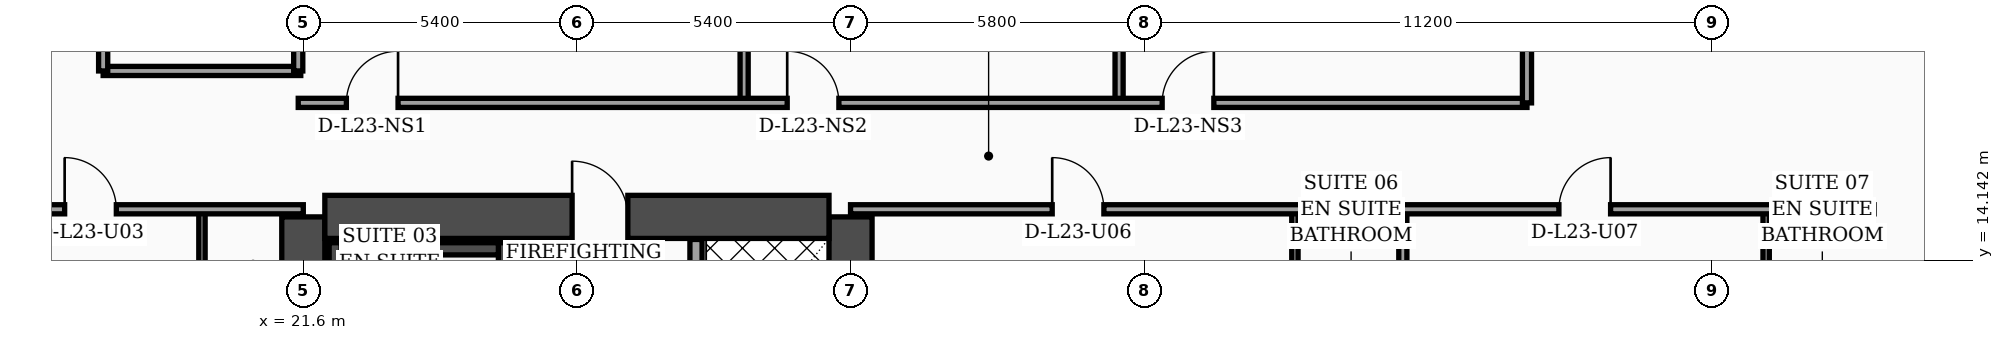
"""IFC4 building model, lengths in metres.
Left out: names, types, materials, properties, quantities, classifications, styles, units other than length and angle.
Written with IfcOpenShell. Run it as: python <this file> out.ifc"""

import sys

from ifc_helpers import new_model, si_unit, direction, frame, frame_2d, origin, place, context, subcontext, project, spatial, rectangle, extrude, element, fill, save


model = new_model("IFC4")
c1 = context("Model", 3, precision=1e-05, world=origin(), true_north=direction((0.0, 1.0)))
c2 = subcontext(c1, "Body", "Model", "MODEL_VIEW")
j1 = project(units=[si_unit("LENGTHUNIT", "METRE"), si_unit("PLANEANGLEUNIT", "RADIAN")], contexts=[c1])
p1 = place(None, origin())
s1 = spatial("IfcSite", under=j1, at=p1, CompositionType="ELEMENT")
p2 = place(p1, origin())
s2 = spatial("IfcBuilding", under=s1, at=p2, CompositionType="ELEMENT")
p3 = place(p2, frame((0.0, 0.0, 97.4)))
s3 = spatial("IfcBuildingStorey", under=s2, at=p3, CompositionType="ELEMENT", Elevation=97.4)
for number, where, z_axis, x_axis in (
    (1, (21.6, 4.6, 0.0), (0.0, 0.0, 1.0), (0.0, 1.0, 0.0)),
    (2, (32.4, 4.6, 0.0), (0.0, 0.0, 1.0), (0.0, 1.0, 0.0)),
):
    element("IfcWall", number, at=place(p3, frame(where, z_axis=z_axis, x_axis=x_axis)), inside=s3, PredefinedType="SHEAR", context=c2, shape_type="SweptSolid", body=[
        extrude(rectangle(XDim=10.4, YDim=0.85, at=frame_2d((5.2, 0.0))), origin(), (0.0, 0.0, 1.0), 3.56),
    ])
p4 = place(p3, frame((22.025, 15.0, 0.0), z_axis=(0.0, 0.0, 1.0), x_axis=(1.0, 0.0, 0.0)))
e3 = element("IfcWall", 3, at=p4, inside=s3, PredefinedType="SHEAR", context=c2, shape_type="SweptSolid", body=[
    extrude(rectangle(XDim=9.95, YDim=0.85, at=frame_2d((4.975, 0.0))), origin(), (0.0, 0.0, 1.0), 3.56),
])
p5 = place(p4, frame((4.88, 0.0, 0.0)))
e4 = element("IfcOpeningElement", 4, at=p5, cuts=e3, PredefinedType="OPENING", context=c2, shape_type="SweptSolid", body=[
    extrude(rectangle(XDim=1.1, YDim=2.2, at=frame_2d((0.55, 1.1))), frame((0.0, 0.435, 0.0), z_axis=(0.0, -1.0, 0.0), x_axis=(1.0, 0.0, 0.0)), (0.0, 0.0, 1.0), 0.87),
])
p6 = place(p3, frame((22.23, 5.025, 0.0), z_axis=(0.0, 0.0, 1.0), x_axis=(0.0, 1.0, 0.0)))
e5 = element("IfcWall", 5, at=p6, inside=s3, PredefinedType="SOLIDWALL", context=c2, shape_type="SweptSolid", body=[
    extrude(rectangle(XDim=9.465, YDim=0.24, at=frame_2d((4.732, 0.0))), origin(), (0.0, 0.0, 1.0), 3.56),
])
p7 = place(p3, frame((25.57, 5.025, 0.0), z_axis=(0.0, 0.0, 1.0), x_axis=(0.0, 1.0, 0.0)))
e6 = element("IfcWall", 6, at=p7, inside=s3, PredefinedType="SOLIDWALL", context=c2, shape_type="SweptSolid", body=[
    extrude(rectangle(XDim=9.465, YDim=0.24, at=frame_2d((4.732, 0.0))), origin(), (0.0, 0.0, 1.0), 3.56),
])
p8 = place(p7, frame((0.35, 0.0, 0.0)))
e7 = element("IfcOpeningElement", 7, at=p8, cuts=e6, PredefinedType="OPENING", context=c2, shape_type="SweptSolid", body=[
    extrude(rectangle(XDim=1.15, YDim=2.2, at=frame_2d((0.575, 1.1))), frame((0.0, 0.13, 0.0), z_axis=(0.0, -1.0, 0.0), x_axis=(1.0, 0.0, 0.0)), (0.0, 0.0, 1.0), 0.26),
])
p9 = place(p3, frame((22.35, 14.37, 0.0), z_axis=(0.0, 0.0, 1.0), x_axis=(1.0, 0.0, 0.0)))
e8 = element("IfcWall", 8, at=p9, inside=s3, PredefinedType="SOLIDWALL", context=c2, shape_type="SweptSolid", body=[
    extrude(rectangle(XDim=3.1, YDim=0.24, at=frame_2d((1.55, 0.0))), origin(), (0.0, 0.0, 1.0), 3.56),
])
p10 = place(p3, frame((59.23, 5.505, 0.0), z_axis=(0.0, 0.0, 1.0), x_axis=(-0.300509063924, 0.953778958931, 0.0)))
e9 = element("IfcWall", 9, at=p10, inside=s3, PredefinedType="SOLIDWALL", context=c2, shape_type="SweptSolid", body=[
    extrude(rectangle(XDim=30.814, YDim=0.32, at=frame_2d((15.407, 0.0))), origin(), (0.0, 0.0, 1.0), 3.56),
])
p11 = place(p10, frame((8.9, 0.0, 0.0)))
e10 = element("IfcOpeningElement", 10, at=p11, cuts=e9, PredefinedType="OPENING", context=c2, shape_type="SweptSolid", body=[
    extrude(rectangle(XDim=1.4, YDim=2.25, at=frame_2d((0.7, 1.125))), frame((0.0, 0.17, 0.0), z_axis=(0.0, -1.0, 0.0), x_axis=(1.0, 0.0, 0.0)), (0.0, 0.0, 1.0), 0.34),
])
p12 = place(p10, frame((1.6, 0.0, 0.75)))
e11 = element("IfcOpeningElement", 11, at=p12, cuts=e9, PredefinedType="OPENING", context=c2, shape_type="SweptSolid", body=[
    extrude(rectangle(XDim=1.5, YDim=1.6, at=frame_2d((0.75, 0.8))), frame((0.0, 0.17, 0.0), z_axis=(0.0, -1.0, 0.0), x_axis=(1.0, 0.0, 0.0)), (0.0, 0.0, 1.0), 0.34),
])
p13 = place(p10, frame((4.7, 0.0, 0.75)))
e12 = element("IfcOpeningElement", 12, at=p13, cuts=e9, PredefinedType="OPENING", context=c2, shape_type="SweptSolid", body=[
    extrude(rectangle(XDim=1.5, YDim=1.6, at=frame_2d((0.75, 0.8))), frame((0.0, 0.17, 0.0), z_axis=(0.0, -1.0, 0.0), x_axis=(1.0, 0.0, 0.0)), (0.0, 0.0, 1.0), 0.34),
])
p14 = place(p10, frame((6.75, 0.0, 0.75)))
e13 = element("IfcOpeningElement", 13, at=p14, cuts=e9, PredefinedType="OPENING", context=c2, shape_type="SweptSolid", body=[
    extrude(rectangle(XDim=1.5, YDim=1.6, at=frame_2d((0.75, 0.8))), frame((0.0, 0.17, 0.0), z_axis=(0.0, -1.0, 0.0), x_axis=(1.0, 0.0, 0.0)), (0.0, 0.0, 1.0), 0.34),
])
p15 = place(p10, frame((10.9, 0.0, 0.75)))
e14 = element("IfcOpeningElement", 14, at=p15, cuts=e9, PredefinedType="OPENING", context=c2, shape_type="SweptSolid", body=[
    extrude(rectangle(XDim=1.5, YDim=1.6, at=frame_2d((0.75, 0.8))), frame((0.0, 0.17, 0.0), z_axis=(0.0, -1.0, 0.0), x_axis=(1.0, 0.0, 0.0)), (0.0, 0.0, 1.0), 0.34),
])
p16 = place(p10, frame((14.0, 0.0, 0.75)))
e15 = element("IfcOpeningElement", 15, at=p16, cuts=e9, PredefinedType="OPENING", context=c2, shape_type="SweptSolid", body=[
    extrude(rectangle(XDim=1.5, YDim=1.6, at=frame_2d((0.75, 0.8))), frame((0.0, 0.17, 0.0), z_axis=(0.0, -1.0, 0.0), x_axis=(1.0, 0.0, 0.0)), (0.0, 0.0, 1.0), 0.34),
])
p17 = place(p10, frame((17.1, 0.0, 0.75)))
e16 = element("IfcOpeningElement", 16, at=p17, cuts=e9, PredefinedType="OPENING", context=c2, shape_type="SweptSolid", body=[
    extrude(rectangle(XDim=1.5, YDim=1.6, at=frame_2d((0.75, 0.8))), frame((0.0, 0.17, 0.0), z_axis=(0.0, -1.0, 0.0), x_axis=(1.0, 0.0, 0.0)), (0.0, 0.0, 1.0), 0.34),
])
p18 = place(p10, frame((20.2, 0.0, 0.75)))
e17 = element("IfcOpeningElement", 17, at=p18, cuts=e9, PredefinedType="OPENING", context=c2, shape_type="SweptSolid", body=[
    extrude(rectangle(XDim=1.5, YDim=1.6, at=frame_2d((0.75, 0.8))), frame((0.0, 0.17, 0.0), z_axis=(0.0, -1.0, 0.0), x_axis=(1.0, 0.0, 0.0)), (0.0, 0.0, 1.0), 0.34),
])
p19 = place(p10, frame((23.3, 0.0, 0.75)))
e18 = element("IfcOpeningElement", 18, at=p19, cuts=e9, PredefinedType="OPENING", context=c2, shape_type="SweptSolid", body=[
    extrude(rectangle(XDim=1.5, YDim=1.6, at=frame_2d((0.75, 0.8))), frame((0.0, 0.17, 0.0), z_axis=(0.0, -1.0, 0.0), x_axis=(1.0, 0.0, 0.0)), (0.0, 0.0, 1.0), 0.34),
])
p20 = place(p10, frame((26.4, 0.0, 0.75)))
e19 = element("IfcOpeningElement", 19, at=p20, cuts=e9, PredefinedType="OPENING", context=c2, shape_type="SweptSolid", body=[
    extrude(rectangle(XDim=1.5, YDim=1.6, at=frame_2d((0.75, 0.8))), frame((0.0, 0.17, 0.0), z_axis=(0.0, -1.0, 0.0), x_axis=(1.0, 0.0, 0.0)), (0.0, 0.0, 1.0), 0.34),
])
p21 = place(p3, frame((29.35, 5.045, 0.0), z_axis=(0.0, 0.0, 1.0), x_axis=(0.0, 1.0, 0.0)))
e20 = element("IfcWall", 20, at=p21, inside=s3, PredefinedType="SOLIDWALL", context=c2, shape_type="SweptSolid", body=[
    extrude(rectangle(XDim=9.51, YDim=0.24, at=frame_2d((4.755, 0.0))), origin(), (0.0, 0.0, 1.0), 3.56),
])
p22 = place(p21, frame((0.55, 0.0, 0.0)))
e21 = element("IfcOpeningElement", 21, at=p22, cuts=e20, PredefinedType="OPENING", context=c2, shape_type="SweptSolid", body=[
    extrude(rectangle(XDim=1.3, YDim=2.35, at=frame_2d((0.65, 1.175))), frame((0.0, 0.13, 0.0), z_axis=(0.0, -1.0, 0.0), x_axis=(1.0, 0.0, 0.0)), (0.0, 0.0, 1.0), 0.26),
])
p23 = place(p3, frame((19.6, 2.44, 0.0), z_axis=(0.0, 0.0, 1.0), x_axis=(0.0, 1.0, 0.0)))
e22 = element("IfcWall", 22, at=p23, inside=s3, PredefinedType="PARTITIONING", context=c2, shape_type="SweptSolid", body=[
    extrude(rectangle(XDim=12.71, YDim=0.125, at=frame_2d((6.355, 0.0))), origin(), (0.0, 0.0, 1.0), 2.49),
])
p24 = place(p23, frame((4.34, 0.0, 0.0)))
e23 = element("IfcOpeningElement", 23, at=p24, cuts=e22, PredefinedType="OPENING", context=c2, shape_type="SweptSolid", body=[
    extrude(rectangle(XDim=0.96, YDim=2.2, at=frame_2d((0.48, 1.1))), frame((0.0, 0.073, 0.0), z_axis=(0.0, -1.0, 0.0), x_axis=(1.0, 0.0, 0.0)), (0.0, 0.0, 1.0), 0.145),
])
p25 = place(p23, frame((10.18, 0.0, 0.0)))
e24 = element("IfcOpeningElement", 24, at=p25, cuts=e22, PredefinedType="OPENING", context=c2, shape_type="SweptSolid", body=[
    extrude(rectangle(XDim=0.9, YDim=2.15, at=frame_2d((0.45, 1.075))), frame((0.0, 0.073, 0.0), z_axis=(0.0, -1.0, 0.0), x_axis=(1.0, 0.0, 0.0)), (0.0, 0.0, 1.0), 0.145),
])
p26 = place(p3, frame((15.15, 15.15, 0.0), z_axis=(0.0, 0.0, 1.0), x_axis=(1.0, 0.0, 0.0)))
e25 = element("IfcWall", 25, at=p26, inside=s3, PredefinedType="PARTITIONING", context=c2, shape_type="SweptSolid", body=[
    extrude(rectangle(XDim=6.45, YDim=0.18, at=frame_2d((3.225, 0.0))), origin(), (0.0, 0.0, 1.0), 2.49),
])
p27 = place(p26, frame((1.74, 0.0, 0.0)))
e26 = element("IfcOpeningElement", 26, at=p27, cuts=e25, PredefinedType="OPENING", context=c2, shape_type="SweptSolid", body=[
    extrude(rectangle(XDim=1.02, YDim=2.2, at=frame_2d((0.51, 1.1))), frame((0.0, 0.1, 0.0), z_axis=(0.0, -1.0, 0.0), x_axis=(1.0, 0.0, 0.0)), (0.0, 0.0, 1.0), 0.2),
])
p28 = place(p3, frame((17.65, 17.88, 0.0), z_axis=(0.0, 0.0, 1.0), x_axis=(1.0, 0.0, 0.0)))
e27 = element("IfcWall", 27, at=p28, inside=s3, PredefinedType="PARTITIONING", context=c2, shape_type="SweptSolid", body=[
    extrude(rectangle(XDim=3.9, YDim=0.18, at=frame_2d((1.95, 0.0))), origin(), (0.0, 0.0, 1.0), 3.56),
])
p29 = place(p3, frame((21.5, 17.88, 0.0), z_axis=(0.0, 0.0, 1.0), x_axis=(0.0, 1.0, 0.0)))
e28 = element("IfcWall", 28, at=p29, inside=s3, PredefinedType="PARTITIONING", context=c2, shape_type="SweptSolid", body=[
    extrude(rectangle(XDim=6.44, YDim=0.18, at=frame_2d((3.22, 0.0))), origin(), (0.0, 0.0, 1.0), 3.56),
])
p30 = place(p3, frame((17.65, 17.88, 0.0), z_axis=(0.0, 0.0, 1.0), x_axis=(0.0, 1.0, 0.0)))
e29 = element("IfcWall", 29, at=p30, inside=s3, PredefinedType="PARTITIONING", context=c2, shape_type="SweptSolid", body=[
    extrude(rectangle(XDim=6.44, YDim=0.18, at=frame_2d((3.22, 0.0))), origin(), (0.0, 0.0, 1.0), 3.56),
])
p31 = place(p30, frame((0.65, 0.0, 0.0)))
e30 = element("IfcOpeningElement", 30, at=p31, cuts=e29, PredefinedType="OPENING", context=c2, shape_type="SweptSolid", body=[
    extrude(rectangle(XDim=0.98, YDim=2.15, at=frame_2d((0.49, 1.075))), frame((0.0, 0.1, 0.0), z_axis=(0.0, -1.0, 0.0), x_axis=(1.0, 0.0, 0.0)), (0.0, 0.0, 1.0), 0.2),
])
p32 = place(p30, frame((3.97, 0.0, 0.0)))
e31 = element("IfcOpeningElement", 31, at=p32, cuts=e29, PredefinedType="OPENING", context=c2, shape_type="SweptSolid", body=[
    extrude(rectangle(XDim=0.96, YDim=2.2, at=frame_2d((0.48, 1.1))), frame((0.0, 0.1, 0.0), z_axis=(0.0, -1.0, 0.0), x_axis=(1.0, 0.0, 0.0)), (0.0, 0.0, 1.0), 0.2),
])
p33 = place(p3, frame((41.17, 2.44, 0.0), z_axis=(0.0, 0.0, 1.0), x_axis=(0.0, 1.0, 0.0)))
e32 = element("IfcWall", 32, at=p33, inside=s3, PredefinedType="PARTITIONING", context=c2, shape_type="SweptSolid", body=[
    extrude(rectangle(XDim=12.71, YDim=0.125, at=frame_2d((6.355, 0.0))), origin(), (0.0, 0.0, 1.0), 3.04),
])
p34 = place(p33, frame((4.35, 0.0, 0.0)))
e33 = element("IfcOpeningElement", 33, at=p34, cuts=e32, PredefinedType="OPENING", context=c2, shape_type="SweptSolid", body=[
    extrude(rectangle(XDim=0.96, YDim=2.2, at=frame_2d((0.48, 1.1))), frame((0.0, 0.073, 0.0), z_axis=(0.0, -1.0, 0.0), x_axis=(1.0, 0.0, 0.0)), (0.0, 0.0, 1.0), 0.145),
])
p35 = place(p33, frame((10.21, 0.0, 0.0)))
e34 = element("IfcOpeningElement", 34, at=p35, cuts=e32, PredefinedType="OPENING", context=c2, shape_type="SweptSolid", body=[
    extrude(rectangle(XDim=0.9, YDim=2.15, at=frame_2d((0.45, 1.075))), frame((0.0, 0.073, 0.0), z_axis=(0.0, -1.0, 0.0), x_axis=(1.0, 0.0, 0.0)), (0.0, 0.0, 1.0), 0.145),
])
p36 = place(p3, frame((50.47, 2.44, 0.0), z_axis=(0.0, 0.0, 1.0), x_axis=(0.0, 1.0, 0.0)))
e35 = element("IfcWall", 35, at=p36, inside=s3, PredefinedType="PARTITIONING", context=c2, shape_type="SweptSolid", body=[
    extrude(rectangle(XDim=12.71, YDim=0.125, at=frame_2d((6.355, 0.0))), origin(), (0.0, 0.0, 1.0), 3.04),
])
p37 = place(p36, frame((4.35, 0.0, 0.0)))
e36 = element("IfcOpeningElement", 36, at=p37, cuts=e35, PredefinedType="OPENING", context=c2, shape_type="SweptSolid", body=[
    extrude(rectangle(XDim=0.96, YDim=2.2, at=frame_2d((0.48, 1.1))), frame((0.0, 0.073, 0.0), z_axis=(0.0, -1.0, 0.0), x_axis=(1.0, 0.0, 0.0)), (0.0, 0.0, 1.0), 0.145),
])
p38 = place(p36, frame((10.21, 0.0, 0.0)))
e37 = element("IfcOpeningElement", 37, at=p38, cuts=e35, PredefinedType="OPENING", context=c2, shape_type="SweptSolid", body=[
    extrude(rectangle(XDim=0.9, YDim=2.15, at=frame_2d((0.45, 1.075))), frame((0.0, 0.073, 0.0), z_axis=(0.0, -1.0, 0.0), x_axis=(1.0, 0.0, 0.0)), (0.0, 0.0, 1.0), 0.145),
])
p39 = place(p3, frame((43.3, 2.44, 0.0), z_axis=(0.0, 0.0, 1.0), x_axis=(0.0, 1.0, 0.0)))
e38 = element("IfcWall", 38, at=p39, inside=s3, PredefinedType="PARTITIONING", context=c2, shape_type="SweptSolid", body=[
    extrude(rectangle(XDim=12.71, YDim=0.16, at=frame_2d((6.355, 0.0))), origin(), (0.0, 0.0, 1.0), 3.04),
])
p40 = place(p3, frame((32.4, 15.15, 0.0), z_axis=(0.0, 0.0, 1.0), x_axis=(1.0, 0.0, 0.0)))
e39 = element("IfcWall", 39, at=p40, inside=s3, PredefinedType="PARTITIONING", context=c2, shape_type="SweptSolid", body=[
    extrude(rectangle(XDim=20.2, YDim=0.18, at=frame_2d((10.1, 0.0))), origin(), (0.0, 0.0, 1.0), 2.84),
])
p41 = place(p40, frame((3.98, 0.0, 0.0)))
e40 = element("IfcOpeningElement", 40, at=p41, cuts=e39, PredefinedType="OPENING", context=c2, shape_type="SweptSolid", body=[
    extrude(rectangle(XDim=1.02, YDim=2.2, at=frame_2d((0.51, 1.1))), frame((0.0, 0.1, 0.0), z_axis=(0.0, -1.0, 0.0), x_axis=(1.0, 0.0, 0.0)), (0.0, 0.0, 1.0), 0.2),
])
p42 = place(p40, frame((13.98, 0.0, 0.0)))
e41 = element("IfcOpeningElement", 41, at=p42, cuts=e39, PredefinedType="OPENING", context=c2, shape_type="SweptSolid", body=[
    extrude(rectangle(XDim=1.02, YDim=2.2, at=frame_2d((0.51, 1.1))), frame((0.0, 0.1, 0.0), z_axis=(0.0, -1.0, 0.0), x_axis=(1.0, 0.0, 0.0)), (0.0, 0.0, 1.0), 0.2),
])
p43 = place(p3, frame((30.3, 17.25, 0.0), z_axis=(0.0, 0.0, 1.0), x_axis=(0.0, 1.0, 0.0)))
e42 = element("IfcWall", 42, at=p43, inside=s3, PredefinedType="PARTITIONING", context=c2, shape_type="SweptSolid", body=[
    extrude(rectangle(XDim=12.08, YDim=0.16, at=frame_2d((6.04, 0.0))), origin(), (0.0, 0.0, 1.0), 2.84),
])
p44 = place(p3, frame((37.7, 17.25, 0.0), z_axis=(0.0, 0.0, 1.0), x_axis=(0.0, 1.0, 0.0)))
e43 = element("IfcWall", 43, at=p44, inside=s3, PredefinedType="PARTITIONING", context=c2, shape_type="SweptSolid", body=[
    extrude(rectangle(XDim=16.2, YDim=0.16, at=frame_2d((8.1, 0.0))), origin(), (0.0, 0.0, 1.0), 2.84),
])
p45 = place(p3, frame((21.5, 17.25, 0.0), z_axis=(0.0, 0.0, 1.0), x_axis=(1.0, 0.0, 0.0)))
e44 = element("IfcWall", 44, at=p45, inside=s3, PredefinedType="PARTITIONING", context=c2, shape_type="SweptSolid", body=[
    extrude(rectangle(XDim=24.25, YDim=0.18, at=frame_2d((12.125, 0.0))), origin(), (0.0, 0.0, 1.0), 2.84),
])
p46 = place(p45, frame((0.95, 0.0, 0.0)))
e45 = element("IfcOpeningElement", 45, at=p46, cuts=e44, PredefinedType="OPENING", context=c2, shape_type="SweptSolid", body=[
    extrude(rectangle(XDim=1.02, YDim=2.2, at=frame_2d((0.51, 1.1))), frame((0.0, 0.1, 0.0), z_axis=(0.0, -1.0, 0.0), x_axis=(1.0, 0.0, 0.0)), (0.0, 0.0, 1.0), 0.2),
])
p47 = place(p45, frame((9.65, 0.0, 0.0)))
e46 = element("IfcOpeningElement", 46, at=p47, cuts=e44, PredefinedType="OPENING", context=c2, shape_type="SweptSolid", body=[
    extrude(rectangle(XDim=1.02, YDim=2.2, at=frame_2d((0.51, 1.1))), frame((0.0, 0.1, 0.0), z_axis=(0.0, -1.0, 0.0), x_axis=(1.0, 0.0, 0.0)), (0.0, 0.0, 1.0), 0.2),
])
p48 = place(p45, frame((17.05, 0.0, 0.0)))
e47 = element("IfcOpeningElement", 47, at=p48, cuts=e44, PredefinedType="OPENING", context=c2, shape_type="SweptSolid", body=[
    extrude(rectangle(XDim=1.02, YDim=2.2, at=frame_2d((0.51, 1.1))), frame((0.0, 0.1, 0.0), z_axis=(0.0, -1.0, 0.0), x_axis=(1.0, 0.0, 0.0)), (0.0, 0.0, 1.0), 0.2),
])
p49 = place(p3, frame((45.75, 17.25, 0.0), z_axis=(0.0, 0.0, 1.0), x_axis=(0.0, 1.0, 0.0)))
e48 = element("IfcWall", 48, at=p49, inside=s3, PredefinedType="PARTITIONING", context=c2, shape_type="SweptSolid", body=[
    extrude(rectangle(XDim=20.69, YDim=0.18, at=frame_2d((10.345, 0.0))), origin(), (0.0, 0.0, 1.0), 2.84),
])
p50 = place(p27, origin())
e49 = element("IfcDoor", 49, at=p50, inside=s3, OperationType="SINGLE_SWING_LEFT", PredefinedType="DOOR", context=c2, shape_type="SweptSolid", body=[
    extrude(rectangle(XDim=1.02, YDim=2.2, at=frame_2d((0.51, 1.1))), frame((0.0, 0.025, 0.0), z_axis=(0.0, -1.0, 0.0), x_axis=(1.0, 0.0, 0.0)), (0.0, 0.0, 1.0), 0.05),
])
fill(e26, e49)
p51 = place(p41, origin())
e50 = element("IfcDoor", 50, at=p51, inside=s3, OperationType="SINGLE_SWING_LEFT", PredefinedType="DOOR", context=c2, shape_type="SweptSolid", body=[
    extrude(rectangle(XDim=1.02, YDim=2.2, at=frame_2d((0.51, 1.1))), frame((0.0, 0.025, 0.0), z_axis=(0.0, -1.0, 0.0), x_axis=(1.0, 0.0, 0.0)), (0.0, 0.0, 1.0), 0.05),
])
fill(e40, e50)
p52 = place(p42, origin())
e51 = element("IfcDoor", 51, at=p52, inside=s3, OperationType="SINGLE_SWING_RIGHT", PredefinedType="DOOR", context=c2, shape_type="SweptSolid", body=[
    extrude(rectangle(XDim=1.02, YDim=2.2, at=frame_2d((0.51, 1.1))), frame((0.0, 0.025, 0.0), z_axis=(0.0, -1.0, 0.0), x_axis=(1.0, 0.0, 0.0)), (0.0, 0.0, 1.0), 0.05),
])
fill(e41, e51)
p53 = place(p46, origin())
e52 = element("IfcDoor", 52, at=p53, inside=s3, OperationType="SINGLE_SWING_RIGHT", PredefinedType="DOOR", context=c2, shape_type="SweptSolid", body=[
    extrude(rectangle(XDim=1.02, YDim=2.2, at=frame_2d((0.51, 1.1))), frame((0.0, 0.025, 0.0), z_axis=(0.0, -1.0, 0.0), x_axis=(1.0, 0.0, 0.0)), (0.0, 0.0, 1.0), 0.05),
])
fill(e45, e52)
p54 = place(p47, origin())
e53 = element("IfcDoor", 53, at=p54, inside=s3, OperationType="SINGLE_SWING_LEFT", PredefinedType="DOOR", context=c2, shape_type="SweptSolid", body=[
    extrude(rectangle(XDim=1.02, YDim=2.2, at=frame_2d((0.51, 1.1))), frame((0.0, 0.025, 0.0), z_axis=(0.0, -1.0, 0.0), x_axis=(1.0, 0.0, 0.0)), (0.0, 0.0, 1.0), 0.05),
])
fill(e46, e53)
p55 = place(p48, origin())
e54 = element("IfcDoor", 54, at=p55, inside=s3, OperationType="SINGLE_SWING_RIGHT", PredefinedType="DOOR", context=c2, shape_type="SweptSolid", body=[
    extrude(rectangle(XDim=1.02, YDim=2.2, at=frame_2d((0.51, 1.1))), frame((0.0, 0.025, 0.0), z_axis=(0.0, -1.0, 0.0), x_axis=(1.0, 0.0, 0.0)), (0.0, 0.0, 1.0), 0.05),
])
fill(e47, e54)
p56 = place(p5, origin())
e55 = element("IfcDoor", 55, at=p56, inside=s3, OperationType="SINGLE_SWING_LEFT", PredefinedType="DOOR", context=c2, shape_type="SweptSolid", body=[
    extrude(rectangle(XDim=1.1, YDim=2.2, at=frame_2d((0.55, 1.1))), frame((0.0, 0.025, 0.0), z_axis=(0.0, -1.0, 0.0), x_axis=(1.0, 0.0, 0.0)), (0.0, 0.0, 1.0), 0.05),
])
fill(e4, e55)
save(model, sys.argv[1])
